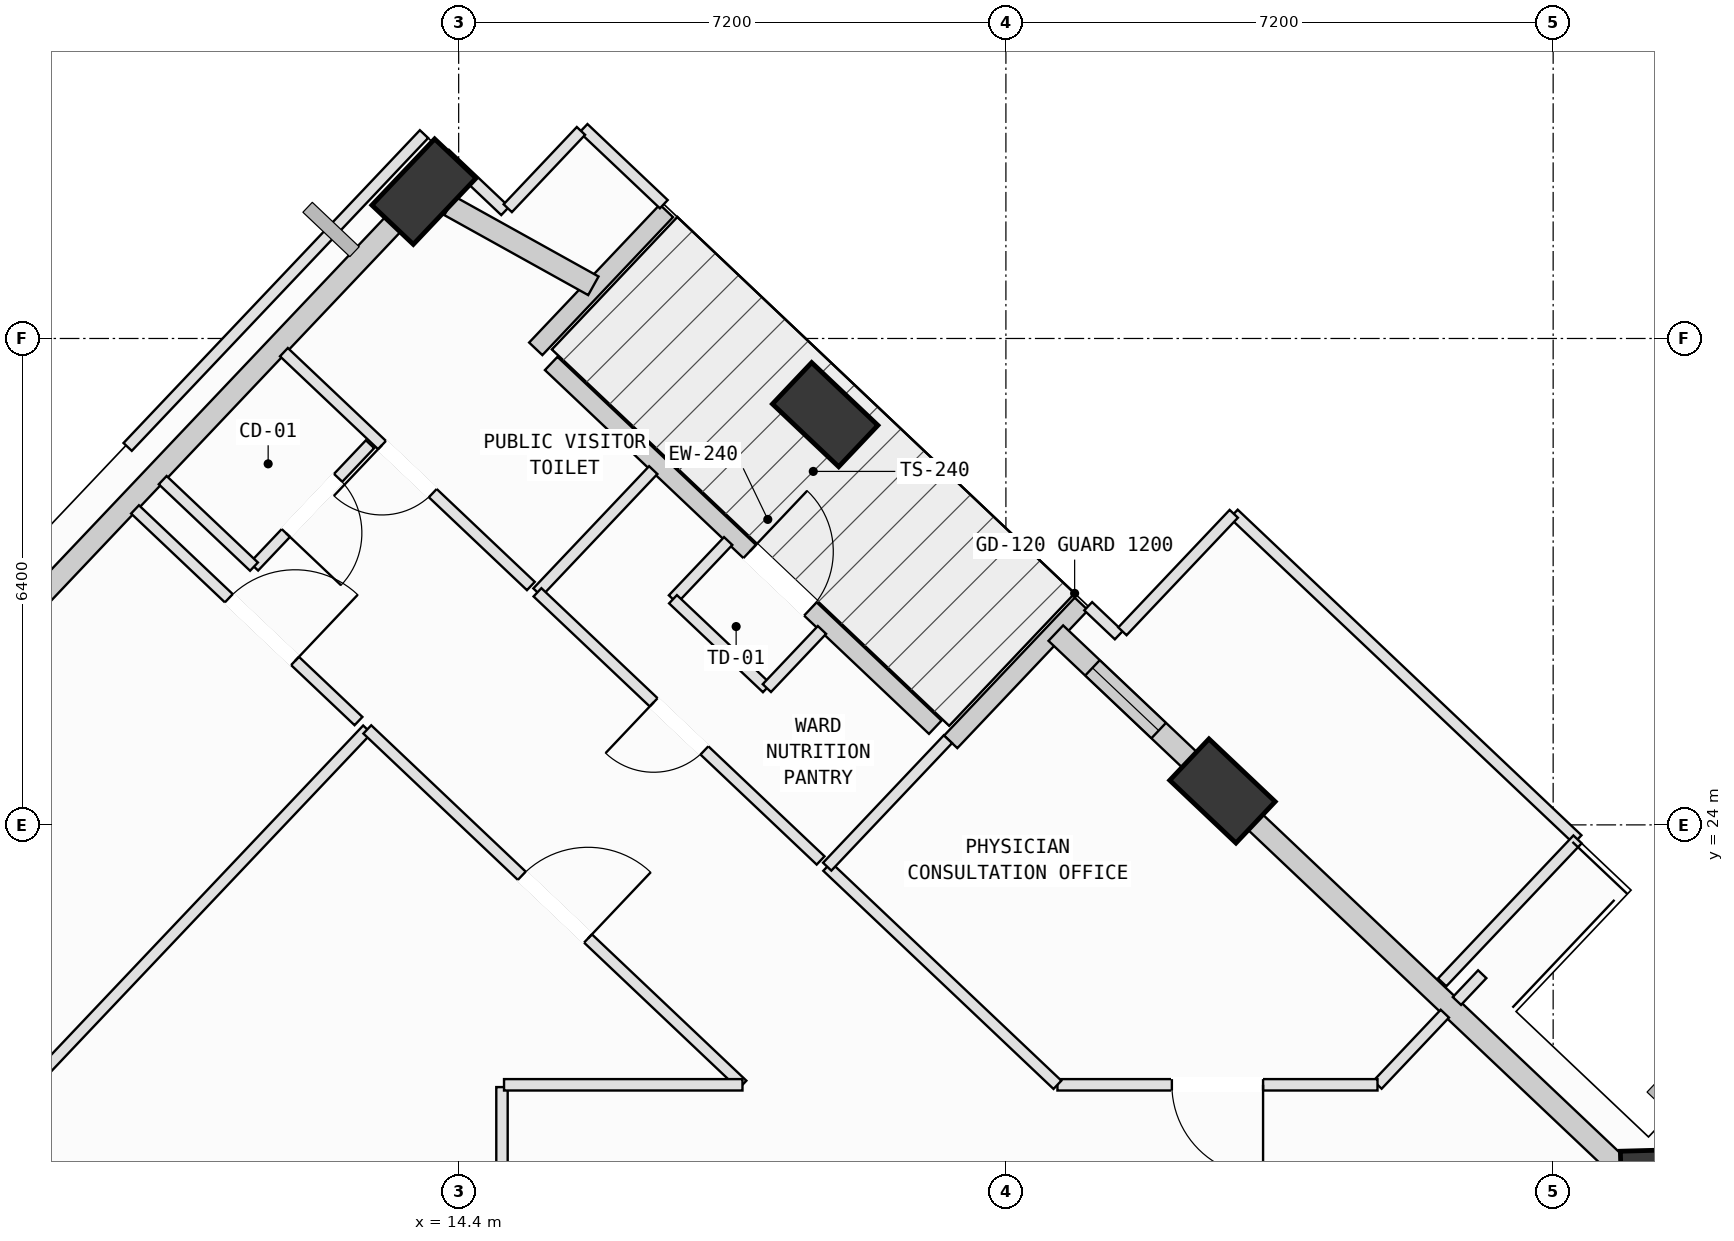
"""IFC4 building model, lengths in metres.
Left out: names, types, materials, properties, quantities, classifications, styles, units other than length and angle.
Written with IfcOpenShell. Run it as: python <this file> out.ifc"""

import sys

from ifc_helpers import new_model, si_unit, direction, frame, frame_2d, origin, origin_2d, place, context, subcontext, project, spatial, rectangle, extrude, element, fill, save


model = new_model("IFC4")
c1 = context("Model", 3, precision=1e-05, world=origin(), true_north=direction((0.0, 1.0)))
c2 = subcontext(c1, "Body", "Model", "MODEL_VIEW")
j1 = project(units=[si_unit("LENGTHUNIT", "METRE"), si_unit("PLANEANGLEUNIT", "RADIAN")], contexts=[c1])
p1 = place(None, origin())
s1 = spatial("IfcSite", under=j1, at=p1, CompositionType="ELEMENT")
p2 = place(p1, origin())
s2 = spatial("IfcBuilding", under=s1, at=p2, CompositionType="ELEMENT")
p3 = place(p2, frame((0.0, 0.0, 223.2)))
s3 = spatial("IfcBuildingStorey", under=s2, at=p3, CompositionType="ELEMENT", Elevation=223.2)
p4 = place(p3, frame((30.075, 19.116, 0.002), z_axis=(0.023694224565, -0.014411951024, 0.999615365723), x_axis=(-0.867784125792, 0.496167464826, 0.027722876321)))
e1 = element("IfcColumn", 1, at=p4, inside=s3, PredefinedType="COLUMN", context=c2, shape_type="SweptSolid", body=[
    extrude(rectangle(XDim=1.2, YDim=0.75, at=origin_2d()), origin(), (0.0, 0.0, 1.0), 3.998),
])
p5 = place(p3, frame((24.449, 24.446, 0.002), z_axis=(0.001770365192, -0.037910233947, 0.999279580482), x_axis=(-0.757242228838, 0.652612436479, 0.026100088441)))
e2 = element("IfcColumn", 2, at=p5, inside=s3, PredefinedType="COLUMN", context=c2, shape_type="SweptSolid", body=[
    extrude(rectangle(XDim=1.2, YDim=0.75, at=origin_2d()), origin(), (0.0, 0.0, 1.0), 3.999),
])
p6 = place(p3, frame((19.222, 29.398, 0.002), z_axis=(-0.018535446197, -0.059630481516, 0.998048417116), x_axis=(-0.489518212806, 0.870934944233, 0.042944641625)))
e3 = element("IfcColumn", 3, at=p6, inside=s3, PredefinedType="COLUMN", context=c2, shape_type="SweptSolid", body=[
    extrude(rectangle(XDim=1.2, YDim=0.75, at=origin_2d()), origin(), (0.0, 0.0, 1.0), 4.004),
])
p7 = place(p3, frame((13.944, 32.332, 0.002), z_axis=(-0.03042990979, -0.081430438597, 0.996214386696), x_axis=(0.897374901251, 0.436732761261, 0.063109284941)))
e4 = element("IfcColumn", 4, at=p7, inside=s3, PredefinedType="COLUMN", context=c2, shape_type="SweptSolid", body=[
    extrude(rectangle(XDim=1.2, YDim=0.75, at=origin_2d()), origin(), (0.0, 0.0, 1.0), 4.011),
])
p8 = place(p3, frame((15.618, 30.071, 0.0), z_axis=(0.0, 0.0, 1.0), x_axis=(0.725983101568, -0.687712538956, 0.0)))
e5 = element("IfcWall", 5, at=p8, inside=s3, PredefinedType="SOLIDWALL", context=c2, shape_type="SweptSolid", body=[
    extrude(rectangle(XDim=6.96, YDim=0.24, at=frame_2d((3.48, 0.0))), origin(), (0.0, 0.0, 1.0), 3.265),
])
p9 = place(p8, frame((3.597, 0.0, 0.0)))
e6 = element("IfcOpeningElement", 6, at=p9, cuts=e5, PredefinedType="OPENING", context=c2, shape_type="SweptSolid", body=[
    extrude(rectangle(XDim=1.1, YDim=2.15, at=frame_2d((0.55, 1.075))), frame((0.0, 0.13, 0.0), z_axis=(0.0, -1.0, 0.0), x_axis=(1.0, 0.0, 0.0)), (0.0, 0.0, 1.0), 0.26),
])
for number, where, z_axis, x_axis in (
    (7, (20.874, 25.092, 0.0), (0.0, 0.0, 1.0), (0.688, 0.726, 0.0)),
    (8, (17.134, 32.079, 0.0), (0.0, 0.0, 1.0), (-0.688, -0.726, 0.0)),
):
    element("IfcWall", number, at=place(p3, frame(where, z_axis=z_axis, x_axis=x_axis)), inside=s3, PredefinedType="SOLIDWALL", context=c2, shape_type="SweptSolid", body=[
        extrude(rectangle(XDim=2.5, YDim=0.24, at=frame_2d((1.25, 0.0))), origin(), (0.0, 0.0, 1.0), 3.265),
    ])
p10 = place(p3, frame((24.775, 24.138, 0.0), z_axis=(0.0, 0.0, 1.0), x_axis=(0.725970201199, -0.687726156962, 0.0)))
e9 = element("IfcWall", 9, at=p10, inside=s3, PredefinedType="SOLIDWALL", context=c2, shape_type="SweptSolid", body=[
    extrude(rectangle(XDim=6.958, YDim=0.28, at=frame_2d((3.479, 0.0))), origin(), (0.0, 0.0, 1.0), 3.245),
])
p11 = place(p3, frame((22.257, 26.523, 0.0), z_axis=(0.0, 0.0, 1.0), x_axis=(0.726017294515, -0.687676441406, 0.0)))
e10 = element("IfcWall", 10, at=p11, inside=s3, PredefinedType="SOLIDWALL", context=c2, shape_type="SweptSolid", body=[
    extrude(rectangle(XDim=2.681, YDim=0.28, at=frame_2d((1.34, 0.0))), origin(), (0.0, 0.0, 1.0), 3.245),
])
p12 = place(p11, frame((0.664, 0.0, 0.75)))
e11 = element("IfcOpeningElement", 11, at=p12, cuts=e10, PredefinedType="OPENING", context=c2, shape_type="SweptSolid", body=[
    extrude(rectangle(XDim=1.2, YDim=1.75, at=frame_2d((0.6, 0.875))), frame((0.0, 0.15, 0.0), z_axis=(0.0, -1.0, 0.0), x_axis=(1.0, 0.0, 0.0)), (0.0, 0.0, 1.0), 0.3),
])
p13 = place(p3, frame((14.279, 32.146, 0.0), z_axis=(0.0, 0.0, 1.0), x_axis=(0.874050913104, -0.485834335244, 0.0)))
e12 = element("IfcWall", 12, at=p13, inside=s3, PredefinedType="SOLIDWALL", context=c2, shape_type="SweptSolid", body=[
    extrude(rectangle(XDim=2.166, YDim=0.28, at=frame_2d((1.083, 0.0))), origin(), (0.0, 0.0, 1.0), 3.245),
])
p14 = place(p3, frame((8.451, 26.534, 0.0), z_axis=(0.0, 0.0, 1.0), x_axis=(0.687701834899, 0.725993241206, 0.0)))
e13 = element("IfcWall", 13, at=p14, inside=s3, PredefinedType="SOLIDWALL", context=c2, shape_type="SweptSolid", body=[
    extrude(rectangle(XDim=7.434, YDim=0.28, at=frame_2d((3.717, 0.0))), origin(), (0.0, 0.0, 1.0), 3.265),
])
p15 = place(p3, frame((14.97, 20.55, 0.0), z_axis=(0.0, 0.0, 1.0), x_axis=(0.0, -1.0, 0.0)))
e14 = element("IfcWall", 14, at=p15, inside=s3, PredefinedType="PARTITIONING", context=c2, shape_type="SweptSolid", body=[
    extrude(rectangle(XDim=2.32, YDim=0.15, at=frame_2d((1.16, 0.0))), origin(), (0.0, 0.0, 1.0), 3.78),
])
p16 = place(p3, frame((3.584, 15.107, 0.0), z_axis=(0.0, 0.0, 1.0), x_axis=(0.687707348385, 0.72598801848, 0.0)))
e15 = element("IfcWall", 15, at=p16, inside=s3, PredefinedType="PARTITIONING", context=c2, shape_type="SweptSolid", body=[
    extrude(rectangle(XDim=13.98, YDim=0.15, at=frame_2d((6.99, 0.0))), origin(), (0.0, 0.0, 1.0), 3.78),
])
p17 = place(p3, frame((13.198, 25.256, 0.0), z_axis=(0.0, 0.0, 1.0), x_axis=(0.725968723938, -0.687727716371, 0.0)))
e16 = element("IfcWall", 16, at=p17, inside=s3, PredefinedType="PARTITIONING", context=c2, shape_type="SweptSolid", body=[
    extrude(rectangle(XDim=6.799, YDim=0.15, at=frame_2d((3.4, 0.0))), origin(), (0.0, 0.0, 1.0), 3.78),
])
p18 = place(p17, frame((2.8, 0.0, 0.0)))
e17 = element("IfcOpeningElement", 17, at=p18, cuts=e16, PredefinedType="OPENING", context=c2, shape_type="SweptSolid", body=[
    extrude(rectangle(XDim=1.2, YDim=2.15, at=frame_2d((0.6, 1.075))), frame((0.0, 0.085, 0.0), z_axis=(0.0, -1.0, 0.0), x_axis=(1.0, 0.0, 0.0)), (0.0, 0.0, 1.0), 0.17),
])
p19 = place(p3, frame((18.134, 20.58, 0.0), z_axis=(0.0, 0.0, 1.0), x_axis=(-1.0, 0.0, 0.0)))
e18 = element("IfcWall", 18, at=p19, inside=s3, PredefinedType="PARTITIONING", context=c2, shape_type="SweptSolid", body=[
    extrude(rectangle(XDim=3.137, YDim=0.15, at=frame_2d((1.568, 0.0))), origin(), (0.0, 0.0, 1.0), 3.78),
])
p20 = place(p3, frame((10.142, 28.151, 0.0), z_axis=(0.0, 0.0, 1.0), x_axis=(0.725989119773, -0.687706185788, 0.0)))
e19 = element("IfcWall", 19, at=p20, inside=s3, PredefinedType="PARTITIONING", context=c2, shape_type="SweptSolid", body=[
    extrude(rectangle(XDim=4.05, YDim=0.15, at=frame_2d((2.025, 0.0))), origin(), (0.0, 0.0, 1.0), 3.78),
])
p21 = place(p20, frame((1.7, 0.0, 0.0)))
e20 = element("IfcOpeningElement", 20, at=p21, cuts=e19, PredefinedType="OPENING", context=c2, shape_type="SweptSolid", body=[
    extrude(rectangle(XDim=1.2, YDim=2.15, at=frame_2d((0.6, 1.075))), frame((0.0, 0.085, 0.0), z_axis=(0.0, -1.0, 0.0), x_axis=(1.0, 0.0, 0.0)), (0.0, 0.0, 1.0), 0.17),
])
p22 = place(p3, frame((27.867, 22.035, 0.0), z_axis=(0.0, 0.0, 1.0), x_axis=(-0.687437044311, -0.726243974232, 0.0)))
e21 = element("IfcWall", 21, at=p22, inside=s3, PredefinedType="PARTITIONING", context=c2, shape_type="SweptSolid", body=[
    extrude(rectangle(XDim=0.484, YDim=0.15, at=frame_2d((0.242, 0.0))), origin(), (0.0, 0.0, 1.0), 3.78),
])
p23 = place(p3, frame((27.375, 21.516, 0.0), z_axis=(0.0, 0.0, 1.0), x_axis=(-0.687424078964, -0.726256246555, 0.0)))
e22 = element("IfcWall", 22, at=p23, inside=s3, PredefinedType="PARTITIONING", context=c2, shape_type="SweptSolid", body=[
    extrude(rectangle(XDim=1.289, YDim=0.15, at=frame_2d((0.645, 0.0))), origin(), (0.0, 0.0, 1.0), 3.78),
])
p24 = place(p3, frame((26.489, 20.58, 0.0), z_axis=(0.0, 0.0, 1.0), x_axis=(-1.0, 0.0, 0.0)))
e23 = element("IfcWall", 23, at=p24, inside=s3, PredefinedType="PARTITIONING", context=c2, shape_type="SweptSolid", body=[
    extrude(rectangle(XDim=4.211, YDim=0.15, at=frame_2d((2.105, 0.0))), origin(), (0.0, 0.0, 1.0), 3.415),
])
p25 = place(p24, frame((1.506, 0.0, 0.0)))
e24 = element("IfcOpeningElement", 24, at=p25, cuts=e23, PredefinedType="OPENING", context=c2, shape_type="SweptSolid", body=[
    extrude(rectangle(XDim=1.2, YDim=2.15, at=frame_2d((0.6, 1.075))), frame((0.0, 0.085, 0.0), z_axis=(0.0, -1.0, 0.0), x_axis=(1.0, 0.0, 0.0)), (0.0, 0.0, 1.0), 0.17),
])
p26 = place(p3, frame((22.278, 20.58, 0.0), z_axis=(0.0, 0.0, 1.0), x_axis=(-0.725923471365, 0.687775482059, 0.0)))
e25 = element("IfcWall", 25, at=p26, inside=s3, PredefinedType="PARTITIONING", context=c2, shape_type="SweptSolid", body=[
    extrude(rectangle(XDim=4.173, YDim=0.15, at=frame_2d((2.086, 0.0))), origin(), (0.0, 0.0, 1.0), 3.78),
])
p27 = place(p3, frame((19.249, 23.45, 0.0), z_axis=(0.0, 0.0, 1.0), x_axis=(0.687551100997, 0.726135995195, 0.0)))
e26 = element("IfcWall", 26, at=p27, inside=s3, PredefinedType="PARTITIONING", context=c2, shape_type="SweptSolid", body=[
    extrude(rectangle(XDim=2.31, YDim=0.15, at=frame_2d((1.155, 0.0))), origin(), (0.0, 0.0, 1.0), 3.78),
])
p28 = place(p3, frame((22.683, 26.877, 0.0), z_axis=(0.0, 0.0, 1.0), x_axis=(0.72581362308, -0.687891404621, 0.0)))
e27 = element("IfcWall", 27, at=p28, inside=s3, PredefinedType="PARTITIONING", context=c2, shape_type="SweptSolid", body=[
    extrude(rectangle(XDim=0.554, YDim=0.15, at=frame_2d((0.277, 0.0))), origin(), (0.0, 0.0, 1.0), 3.78),
])
p29 = place(p3, frame((15.437, 27.06, 0.0), z_axis=(0.0, 0.0, 1.0), x_axis=(0.687665143624, 0.726027995497, 0.0)))
e28 = element("IfcWall", 28, at=p29, inside=s3, PredefinedType="PARTITIONING", context=c2, shape_type="SweptSolid", body=[
    extrude(rectangle(XDim=2.215, YDim=0.15, at=frame_2d((1.107, 0.0))), origin(), (0.0, 0.0, 1.0), 3.78),
])
p30 = place(p3, frame((17.946, 27.735, 0.0), z_axis=(0.0, 0.0, 1.0), x_axis=(-0.687885778475, -0.72581895523, 0.0)))
e29 = element("IfcWall", 29, at=p30, inside=s3, PredefinedType="PARTITIONING", context=c2, shape_type="SweptSolid", body=[
    extrude(rectangle(XDim=1.055, YDim=0.15, at=frame_2d((0.528, 0.0))), origin(), (0.0, 0.0, 1.0), 3.78),
])
p31 = place(p3, frame((17.22, 26.969, 0.0), z_axis=(0.0, 0.0, 1.0), x_axis=(0.726292119924, -0.687386177149, 0.0)))
e30 = element("IfcWall", 30, at=p31, inside=s3, PredefinedType="PARTITIONING", context=c2, shape_type="SweptSolid", body=[
    extrude(rectangle(XDim=1.701, YDim=0.15, at=frame_2d((0.85, 0.0))), origin(), (0.0, 0.0, 1.0), 3.78),
])
p32 = place(p3, frame((18.455, 25.8, 0.0), z_axis=(0.0, 0.0, 1.0), x_axis=(0.687853884213, 0.725849181286, 0.0)))
e31 = element("IfcWall", 31, at=p32, inside=s3, PredefinedType="PARTITIONING", context=c2, shape_type="SweptSolid", body=[
    extrude(rectangle(XDim=1.054, YDim=0.15, at=frame_2d((0.527, 0.0))), origin(), (0.0, 0.0, 1.0), 3.78),
])
p33 = place(p3, frame((19.162, 23.532, 0.0), z_axis=(0.0, 0.0, 1.0), x_axis=(-0.726046457107, 0.68764565157, 0.0)))
e32 = element("IfcWall", 32, at=p33, inside=s3, PredefinedType="PARTITIONING", context=c2, shape_type="SweptSolid", body=[
    extrude(rectangle(XDim=5.131, YDim=0.15, at=frame_2d((2.565, 0.0))), origin(), (0.0, 0.0, 1.0), 3.78),
])
p34 = place(p33, frame((2.105, 0.0, 0.0)))
e33 = element("IfcOpeningElement", 33, at=p34, cuts=e32, PredefinedType="OPENING", context=c2, shape_type="SweptSolid", body=[
    extrude(rectangle(XDim=0.92, YDim=2.1, at=frame_2d((0.46, 1.05))), frame((0.0, 0.085, 0.0), z_axis=(0.0, -1.0, 0.0), x_axis=(1.0, 0.0, 0.0)), (0.0, 0.0, 1.0), 0.17),
])
p35 = place(p3, frame((16.043, 33.167, 0.0), z_axis=(0.0, 0.0, 1.0), x_axis=(0.726146731291, -0.687539762221, 0.0)))
e34 = element("IfcWall", 34, at=p35, inside=s3, PredefinedType="PARTITIONING", context=c2, shape_type="SweptSolid", body=[
    extrude(rectangle(XDim=1.454, YDim=0.15, at=frame_2d((0.727, 0.0))), origin(), (0.0, 0.0, 1.0), 3.78),
])
p36 = place(p3, frame((15.35, 27.143, 0.0), z_axis=(0.0, 0.0, 1.0), x_axis=(-0.726077402079, 0.687612977037, 0.0)))
e35 = element("IfcWall", 35, at=p36, inside=s3, PredefinedType="PARTITIONING", context=c2, shape_type="SweptSolid", body=[
    extrude(rectangle(XDim=4.475, YDim=0.15, at=frame_2d((2.237, 0.0))), origin(), (0.0, 0.0, 1.0), 3.78),
])
p37 = place(p36, frame((1.777, 0.0, 0.0)))
e36 = element("IfcOpeningElement", 36, at=p37, cuts=e35, PredefinedType="OPENING", context=c2, shape_type="SweptSolid", body=[
    extrude(rectangle(XDim=0.92, YDim=2.1, at=frame_2d((0.46, 1.05))), frame((0.0, 0.085, 0.0), z_axis=(0.0, -1.0, 0.0), x_axis=(1.0, 0.0, 0.0)), (0.0, 0.0, 1.0), 0.17),
])
p38 = place(p3, frame((13.426, 32.062, 0.0), z_axis=(0.0, 0.0, 1.0), x_axis=(0.687799943488, 0.725900294625, 0.0)))
e37 = element("IfcWall", 37, at=p38, inside=s3, PredefinedType="PARTITIONING", context=c2, shape_type="SweptSolid", body=[
    extrude(rectangle(XDim=1.102, YDim=0.15, at=frame_2d((0.551, 0.0))), origin(), (0.0, 0.0, 1.0), 3.265),
])
p39 = place(p3, frame((14.22, 32.828, 0.0), z_axis=(0.0, 0.0, 1.0), x_axis=(0.726093826478, -0.687595633458, 0.0)))
e38 = element("IfcWall", 38, at=p39, inside=s3, PredefinedType="PARTITIONING", context=c2, shape_type="SweptSolid", body=[
    extrude(rectangle(XDim=1.091, YDim=0.15, at=frame_2d((0.545, 0.0))), origin(), (0.0, 0.0, 1.0), 3.78),
])
p40 = place(p3, frame((15.046, 32.114, 0.0), z_axis=(0.0, 0.0, 1.0), x_axis=(0.687585096142, 0.72610380495, 0.0)))
e39 = element("IfcWall", 39, at=p40, inside=s3, PredefinedType="PARTITIONING", context=c2, shape_type="SweptSolid", body=[
    extrude(rectangle(XDim=1.401, YDim=0.15, at=frame_2d((0.7, 0.0))), origin(), (0.0, 0.0, 1.0), 3.78),
])
p41 = place(p3, frame((13.234, 29.009, 0.0), z_axis=(0.0, 0.0, 1.0), x_axis=(-0.6878788724, -0.725825500314, 0.0)))
e40 = element("IfcWall", 40, at=p41, inside=s3, PredefinedType="PARTITIONING", context=c2, shape_type="SweptSolid", body=[
    extrude(rectangle(XDim=2.22, YDim=0.15, at=frame_2d((1.11, 0.0))), origin(), (0.0, 0.0, 1.0), 3.78),
])
p42 = place(p41, frame((0.61, 0.0, 0.0)))
e41 = element("IfcOpeningElement", 41, at=p42, cuts=e40, PredefinedType="OPENING", context=c2, shape_type="SweptSolid", body=[
    extrude(rectangle(XDim=1.0, YDim=2.12, at=frame_2d((0.5, 1.06))), frame((0.0, 0.085, 0.0), z_axis=(0.0, -1.0, 0.0), x_axis=(1.0, 0.0, 0.0)), (0.0, 0.0, 1.0), 0.17),
])
p43 = place(p3, frame((11.707, 27.398, 0.0), z_axis=(0.0, 0.0, 1.0), x_axis=(-0.725886759705, 0.687814227888, 0.0)))
e42 = element("IfcWall", 42, at=p43, inside=s3, PredefinedType="PARTITIONING", context=c2, shape_type="SweptSolid", body=[
    extrude(rectangle(XDim=1.655, YDim=0.15, at=frame_2d((0.827, 0.0))), origin(), (0.0, 0.0, 1.0), 3.78),
])
p44 = place(p3, frame((10.045, 28.973, 0.0), z_axis=(0.0, 0.0, 1.0), x_axis=(0.687707621898, 0.725987759389, 0.0)))
e43 = element("IfcWall", 43, at=p44, inside=s3, PredefinedType="PARTITIONING", context=c2, shape_type="SweptSolid", body=[
    extrude(rectangle(XDim=5.67, YDim=0.15, at=frame_2d((2.835, 0.0))), origin(), (0.0, 0.0, 1.0), 3.78),
])
p45 = place(p3, frame((24.598, 28.093, 0.0), z_axis=(0.0, 0.0, 1.0), x_axis=(0.726048445962, -0.687643551643, 0.0)))
e44 = element("IfcWall", 44, at=p45, inside=s3, PredefinedType="PARTITIONING", context=c2, shape_type="SweptSolid", body=[
    extrude(rectangle(XDim=6.23, YDim=0.15, at=frame_2d((3.115, 0.0))), origin(), (0.0, 0.0, 1.0), 3.78),
])
p46 = place(p3, frame((29.121, 23.809, 0.0), z_axis=(0.0, 0.0, 1.0), x_axis=(-0.687522415968, -0.726163154905, 0.0)))
e45 = element("IfcWall", 45, at=p46, inside=s3, PredefinedType="PARTITIONING", context=c2, shape_type="SweptSolid", body=[
    extrude(rectangle(XDim=2.591, YDim=0.15, at=frame_2d((1.295, 0.0))), origin(), (0.0, 0.0, 1.0), 3.78),
])
p47 = place(p3, frame((23.133, 26.547, 0.0), z_axis=(0.0, 0.0, 1.0), x_axis=(0.687820957093, 0.725880383385, 0.0)))
e46 = element("IfcWall", 46, at=p47, inside=s3, PredefinedType="PARTITIONING", context=c2, shape_type="SweptSolid", body=[
    extrude(rectangle(XDim=2.13, YDim=0.15, at=frame_2d((1.065, 0.0))), origin(), (0.0, 0.0, 1.0), 3.78),
])
p48 = place(p9, origin())
e47 = element("IfcDoor", 47, at=p48, inside=s3, OperationType="SINGLE_SWING_LEFT", PredefinedType="DOOR", context=c2, shape_type="SweptSolid", body=[
    extrude(rectangle(XDim=1.1, YDim=2.15, at=frame_2d((0.55, 1.075))), frame((0.0, 0.025, 0.0), z_axis=(0.0, -1.0, 0.0), x_axis=(1.0, 0.0, 0.0)), (0.0, 0.0, 1.0), 0.05),
])
fill(e6, e47)
p49 = place(p12, origin())
e48 = element("IfcWindow", 48, at=p49, inside=s3, PartitioningType="SINGLE_PANEL", PredefinedType="WINDOW", context=c2, shape_type="SweptSolid", body=[
    extrude(rectangle(XDim=1.2, YDim=1.75, at=frame_2d((0.6, 0.875))), frame((0.0, 0.03, 0.0), z_axis=(0.0, -1.0, 0.0), x_axis=(1.0, 0.0, 0.0)), (0.0, 0.0, 1.0), 0.06),
])
fill(e11, e48)
p50 = place(p18, origin())
e49 = element("IfcDoor", 49, at=p50, inside=s3, OperationType="SINGLE_SWING_RIGHT", PredefinedType="DOOR", context=c2, shape_type="SweptSolid", body=[
    extrude(rectangle(XDim=1.2, YDim=2.15, at=frame_2d((0.6, 1.075))), frame((0.0, 0.025, 0.0), z_axis=(0.0, -1.0, 0.0), x_axis=(1.0, 0.0, 0.0)), (0.0, 0.0, 1.0), 0.05),
])
fill(e17, e49)
p51 = place(p21, origin())
e50 = element("IfcDoor", 50, at=p51, inside=s3, OperationType="SINGLE_SWING_RIGHT", PredefinedType="DOOR", context=c2, shape_type="SweptSolid", body=[
    extrude(rectangle(XDim=1.2, YDim=2.15, at=frame_2d((0.6, 1.075))), frame((0.0, 0.025, 0.0), z_axis=(0.0, -1.0, 0.0), x_axis=(1.0, 0.0, 0.0)), (0.0, 0.0, 1.0), 0.05),
])
fill(e20, e50)
p52 = place(p25, origin())
e51 = element("IfcDoor", 51, at=p52, inside=s3, OperationType="SINGLE_SWING_LEFT", PredefinedType="DOOR", context=c2, shape_type="SweptSolid", body=[
    extrude(rectangle(XDim=1.2, YDim=2.15, at=frame_2d((0.6, 1.075))), frame((0.0, 0.025, 0.0), z_axis=(0.0, -1.0, 0.0), x_axis=(1.0, 0.0, 0.0)), (0.0, 0.0, 1.0), 0.05),
])
fill(e24, e51)
p53 = place(p34, origin())
e52 = element("IfcDoor", 52, at=p53, inside=s3, OperationType="SINGLE_SWING_RIGHT", PredefinedType="DOOR", context=c2, shape_type="SweptSolid", body=[
    extrude(rectangle(XDim=0.92, YDim=2.1, at=frame_2d((0.46, 1.05))), frame((0.0, 0.025, 0.0), z_axis=(0.0, -1.0, 0.0), x_axis=(1.0, 0.0, 0.0)), (0.0, 0.0, 1.0), 0.05),
])
fill(e33, e52)
p54 = place(p37, origin())
e53 = element("IfcDoor", 53, at=p54, inside=s3, OperationType="SINGLE_SWING_RIGHT", PredefinedType="DOOR", context=c2, shape_type="SweptSolid", body=[
    extrude(rectangle(XDim=0.92, YDim=2.1, at=frame_2d((0.46, 1.05))), frame((0.0, 0.025, 0.0), z_axis=(0.0, -1.0, 0.0), x_axis=(1.0, 0.0, 0.0)), (0.0, 0.0, 1.0), 0.05),
])
fill(e36, e53)
p55 = place(p42, origin())
e54 = element("IfcDoor", 54, at=p55, inside=s3, OperationType="SINGLE_SWING_RIGHT", PredefinedType="DOOR", context=c2, shape_type="SweptSolid", body=[
    extrude(rectangle(XDim=1.0, YDim=2.12, at=frame_2d((0.5, 1.06))), frame((0.0, 0.025, 0.0), z_axis=(0.0, -1.0, 0.0), x_axis=(1.0, 0.0, 0.0)), (0.0, 0.0, 1.0), 0.05),
])
fill(e41, e54)
save(model, sys.argv[1])
